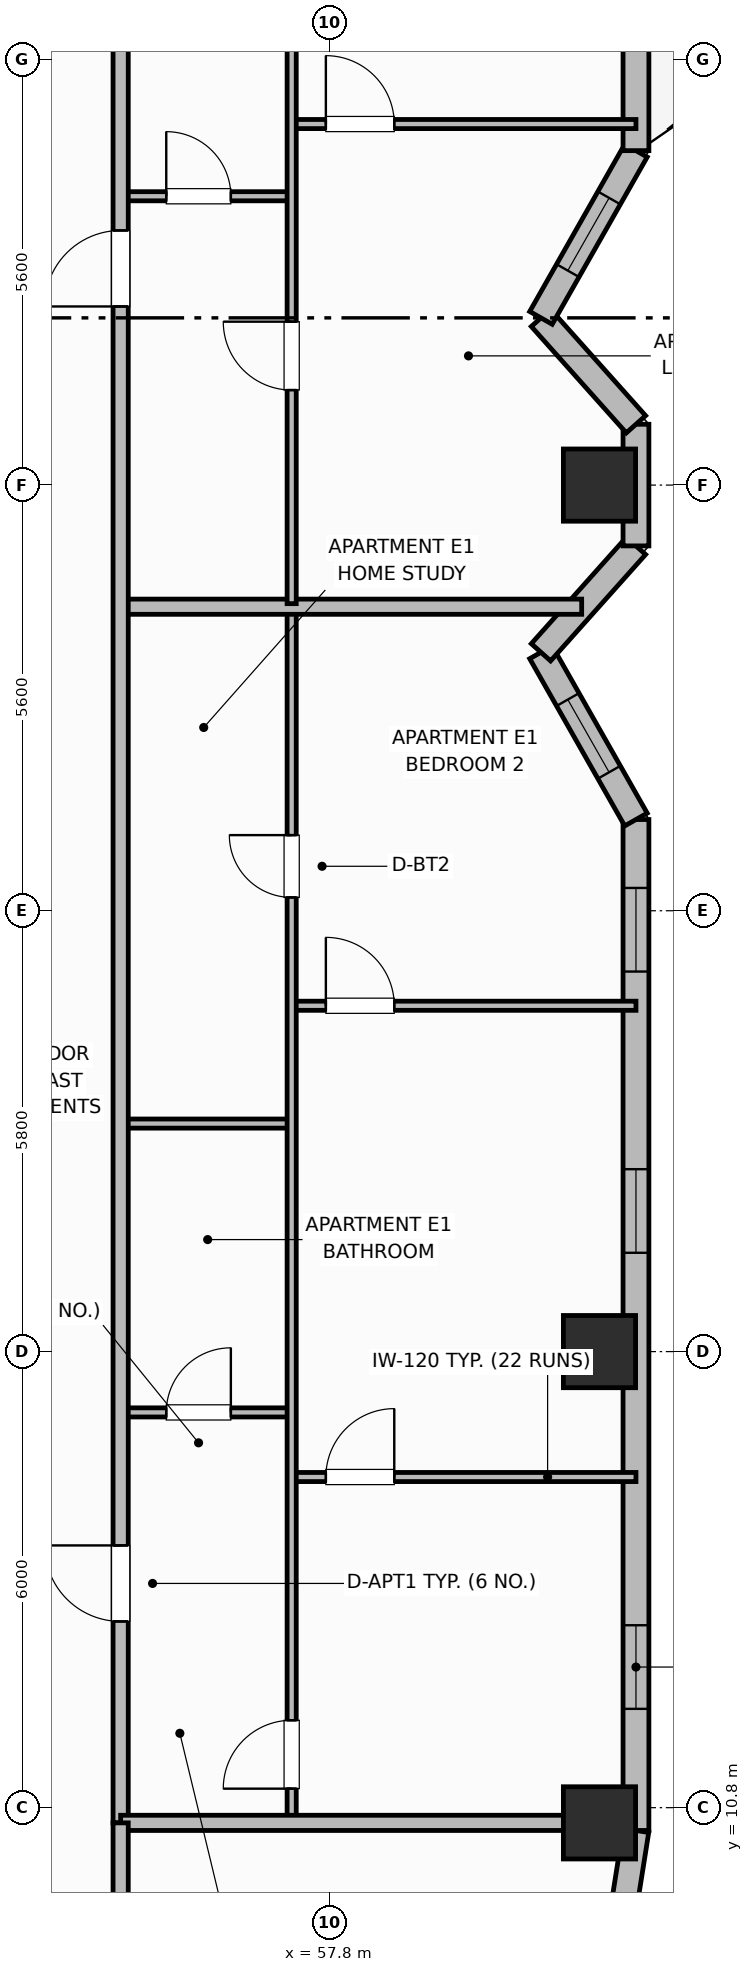
"""IFC4 building model, lengths in metres.
Left out: names, types, materials, properties, quantities, classifications, styles, units other than length and angle.
Written with IfcOpenShell. Run it as: python <this file> out.ifc"""

import sys

from ifc_helpers import new_model, si_unit, direction, frame, frame_2d, origin, origin_2d, place, context, subcontext, project, spatial, rectangle, extrude, element, fill, save


model = new_model("IFC4")
c1 = context("Model", 3, precision=1e-05, world=origin(), true_north=direction((0.0, 1.0)))
c2 = subcontext(c1, "Body", "Model", "MODEL_VIEW")
j1 = project(units=[si_unit("LENGTHUNIT", "METRE"), si_unit("PLANEANGLEUNIT", "RADIAN")], contexts=[c1])
p1 = place(None, origin())
s1 = spatial("IfcSite", under=j1, at=p1, CompositionType="ELEMENT")
p2 = place(p1, origin())
s2 = spatial("IfcBuilding", under=s1, at=p2, CompositionType="ELEMENT")
p3 = place(p2, frame((0.0, 0.0, 170.0)))
s3 = spatial("IfcBuildingStorey", under=s2, at=p3, CompositionType="ELEMENT", Elevation=170.0)
for number, where, z_axis, x_axis in (
    (1, (61.35, 10.6, 0.0), (0.0, 0.0, 1.0), (1.0, 0.0, 0.0)),
    (2, (61.35, 16.8, 0.0), (0.0, 0.0, 1.0), (1.0, 0.0, 0.0)),
    (3, (61.35, 28.2, 0.0), (0.0, 0.0, 1.0), (1.0, 0.0, 0.0)),
):
    element("IfcColumn", number, at=place(p3, frame(where, z_axis=z_axis, x_axis=x_axis)), inside=s3, PredefinedType="COLUMN", context=c2, shape_type="SweptSolid", body=[
        extrude(rectangle(XDim=0.95, YDim=0.95, at=origin_2d()), origin(), (0.0, 0.0, 1.0), 3.7),
    ])
p4 = place(p3, frame((61.652, 9.378, 0.0), z_axis=(0.0, 0.0, 1.0), x_axis=(0.156514556949, 0.987675651954, 0.0)))
e4 = element("IfcWall", 4, at=p4, inside=s3, PredefinedType="SOLIDWALL", context=c2, shape_type="SweptSolid", body=[
    extrude(rectangle(XDim=1.135, YDim=0.34, at=frame_2d((0.568, 0.0))), origin(), (0.0, 0.0, 1.0), 2.72),
])
p5 = place(p3, frame((61.83, 10.5, 0.0), z_axis=(0.0, 0.0, 1.0), x_axis=(0.0, 1.0, 0.0)))
e5 = element("IfcWall", 5, at=p5, inside=s3, PredefinedType="SOLIDWALL", context=c2, shape_type="SweptSolid", body=[
    extrude(rectangle(XDim=13.3, YDim=0.34, at=frame_2d((6.65, 0.0))), origin(), (0.0, 0.0, 1.0), 2.72),
])
p6 = place(p5, frame((1.6, 0.0, 0.95)))
e6 = element("IfcOpeningElement", 6, at=p6, cuts=e5, PredefinedType="OPENING", context=c2, shape_type="SweptSolid", body=[
    extrude(rectangle(XDim=1.1, YDim=1.65, at=frame_2d((0.55, 0.825))), frame((0.0, 0.18, 0.0), z_axis=(0.0, -1.0, 0.0), x_axis=(1.0, 0.0, 0.0)), (0.0, 0.0, 1.0), 0.36),
])
p7 = place(p5, frame((7.6, 0.0, 0.95)))
e7 = element("IfcOpeningElement", 7, at=p7, cuts=e5, PredefinedType="OPENING", context=c2, shape_type="SweptSolid", body=[
    extrude(rectangle(XDim=1.1, YDim=1.65, at=frame_2d((0.55, 0.825))), frame((0.0, 0.18, 0.0), z_axis=(0.0, -1.0, 0.0), x_axis=(1.0, 0.0, 0.0)), (0.0, 0.0, 1.0), 0.36),
])
p8 = place(p5, frame((11.3, 0.0, 0.95)))
e8 = element("IfcOpeningElement", 8, at=p8, cuts=e5, PredefinedType="OPENING", context=c2, shape_type="SweptSolid", body=[
    extrude(rectangle(XDim=1.1, YDim=1.65, at=frame_2d((0.55, 0.825))), frame((0.0, 0.18, 0.0), z_axis=(0.0, -1.0, 0.0), x_axis=(1.0, 0.0, 0.0)), (0.0, 0.0, 1.0), 0.36),
])
p9 = place(p3, frame((61.83, 23.8, 0.0), z_axis=(0.0, 0.0, 1.0), x_axis=(-0.494017696272, 0.869451847873, 0.0)))
e9 = element("IfcWall", 9, at=p9, inside=s3, PredefinedType="SOLIDWALL", context=c2, shape_type="SweptSolid", body=[
    extrude(rectangle(XDim=2.53, YDim=0.34, at=frame_2d((1.265, 0.0))), origin(), (0.0, 0.0, 1.0), 2.72),
])
p10 = place(p9, frame((0.715, 0.0, 0.91)))
e10 = element("IfcOpeningElement", 10, at=p10, cuts=e9, PredefinedType="OPENING", context=c2, shape_type="SweptSolid", body=[
    extrude(rectangle(XDim=1.1, YDim=1.65, at=frame_2d((0.55, 0.825))), frame((0.0, 0.18, 0.0), z_axis=(0.0, -1.0, 0.0), x_axis=(1.0, 0.0, 0.0)), (0.0, 0.0, 1.0), 0.36),
])
p11 = place(p3, frame((60.58, 26.0, 0.0), z_axis=(0.0, 0.0, 1.0), x_axis=(0.666041619974, 0.74591457987, 0.0)))
e11 = element("IfcWall", 11, at=p11, inside=s3, PredefinedType="SOLIDWALL", context=c2, shape_type="SweptSolid", body=[
    extrude(rectangle(XDim=1.877, YDim=0.34, at=frame_2d((0.938, 0.0))), origin(), (0.0, 0.0, 1.0), 2.72),
])
p12 = place(p3, frame((61.83, 27.4, 0.0), z_axis=(0.0, 0.0, 1.0), x_axis=(0.0, 1.0, 0.0)))
e12 = element("IfcWall", 12, at=p12, inside=s3, PredefinedType="SOLIDWALL", context=c2, shape_type="SweptSolid", body=[
    extrude(rectangle(XDim=1.6, YDim=0.34, at=frame_2d((0.8, 0.0))), origin(), (0.0, 0.0, 1.0), 2.72),
])
p13 = place(p3, frame((61.83, 29.0, 0.0), z_axis=(0.0, 0.0, 1.0), x_axis=(-0.666041619974, 0.74591457987, 0.0)))
e13 = element("IfcWall", 13, at=p13, inside=s3, PredefinedType="SOLIDWALL", context=c2, shape_type="SweptSolid", body=[
    extrude(rectangle(XDim=1.877, YDim=0.34, at=frame_2d((0.938, 0.0))), origin(), (0.0, 0.0, 1.0), 2.72),
])
p14 = place(p3, frame((60.58, 30.4, 0.0), z_axis=(0.0, 0.0, 1.0), x_axis=(0.493976255291, 0.869475393101, 0.0)))
e14 = element("IfcWall", 14, at=p14, inside=s3, PredefinedType="SOLIDWALL", context=c2, shape_type="SweptSolid", body=[
    extrude(rectangle(XDim=2.531, YDim=0.34, at=frame_2d((1.265, 0.0))), origin(), (0.0, 0.0, 1.0), 2.72),
])
p15 = place(p14, frame((0.715, 0.0, 0.91)))
e15 = element("IfcOpeningElement", 15, at=p15, cuts=e14, PredefinedType="OPENING", context=c2, shape_type="SweptSolid", body=[
    extrude(rectangle(XDim=1.1, YDim=1.65, at=frame_2d((0.55, 0.825))), frame((0.0, 0.18, 0.0), z_axis=(0.0, -1.0, 0.0), x_axis=(1.0, 0.0, 0.0)), (0.0, 0.0, 1.0), 0.36),
])
p16 = place(p3, frame((61.83, 32.6, 0.0), z_axis=(0.0, 0.0, 1.0), x_axis=(0.0, 1.0, 0.0)))
e16 = element("IfcWall", 16, at=p16, inside=s3, PredefinedType="SOLIDWALL", context=c2, shape_type="SweptSolid", body=[
    extrude(rectangle(XDim=13.3, YDim=0.34, at=frame_2d((6.65, 0.0))), origin(), (0.0, 0.0, 1.0), 2.72),
])
p17 = place(p16, frame((1.7, 0.0, 0.0)))
e17 = element("IfcOpeningElement", 17, at=p17, cuts=e16, PredefinedType="OPENING", context=c2, shape_type="SweptSolid", body=[
    extrude(rectangle(XDim=1.6, YDim=2.1, at=frame_2d((0.8, 1.05))), frame((0.0, 0.18, 0.0), z_axis=(0.0, -1.0, 0.0), x_axis=(1.0, 0.0, 0.0)), (0.0, 0.0, 1.0), 0.36),
])
p18 = place(p16, frame((9.6, 0.0, 0.7)))
e18 = element("IfcOpeningElement", 18, at=p18, cuts=e16, PredefinedType="OPENING", context=c2, shape_type="SweptSolid", body=[
    extrude(rectangle(XDim=2.1, YDim=1.9, at=frame_2d((1.05, 0.95))), frame((0.0, 0.18, 0.0), z_axis=(0.0, -1.0, 0.0), x_axis=(1.0, 0.0, 0.0)), (0.0, 0.0, 1.0), 0.36),
])
p19 = place(p3, frame((55.05, 16.0, 0.0), z_axis=(0.0, 0.0, 1.0), x_axis=(1.0, 0.0, 0.0)))
e19 = element("IfcWall", 19, at=p19, inside=s3, PredefinedType="PARTITIONING", context=c2, shape_type="SweptSolid", body=[
    extrude(rectangle(XDim=2.25, YDim=0.12, at=frame_2d((1.125, 0.0))), origin(), (0.0, 0.0, 1.0), 2.55),
])
p20 = place(p19, frame((0.6, 0.0, 0.0)))
e20 = element("IfcOpeningElement", 20, at=p20, cuts=e19, PredefinedType="OPENING", context=c2, shape_type="SweptSolid", body=[
    extrude(rectangle(XDim=0.85, YDim=2.1, at=frame_2d((0.425, 1.05))), frame((0.0, 0.07, 0.0), z_axis=(0.0, -1.0, 0.0), x_axis=(1.0, 0.0, 0.0)), (0.0, 0.0, 1.0), 0.14),
])
p21 = place(p3, frame((55.05, 19.8, 0.0), z_axis=(0.0, 0.0, 1.0), x_axis=(1.0, 0.0, 0.0)))
e21 = element("IfcWall", 21, at=p21, inside=s3, PredefinedType="PARTITIONING", context=c2, shape_type="SweptSolid", body=[
    extrude(rectangle(XDim=2.25, YDim=0.12, at=frame_2d((1.125, 0.0))), origin(), (0.0, 0.0, 1.0), 2.55),
])
p22 = place(p3, frame((57.3, 15.15, 0.0), z_axis=(0.0, 0.0, 1.0), x_axis=(1.0, 0.0, 0.0)))
e22 = element("IfcWall", 22, at=p22, inside=s3, PredefinedType="PARTITIONING", context=c2, shape_type="SweptSolid", body=[
    extrude(rectangle(XDim=4.53, YDim=0.12, at=frame_2d((2.265, 0.0))), origin(), (0.0, 0.0, 1.0), 2.55),
])
p23 = place(p22, frame((0.45, 0.0, 0.0)))
e23 = element("IfcOpeningElement", 23, at=p23, cuts=e22, PredefinedType="OPENING", context=c2, shape_type="SweptSolid", body=[
    extrude(rectangle(XDim=0.9, YDim=2.1, at=frame_2d((0.45, 1.05))), frame((0.0, 0.07, 0.0), z_axis=(0.0, -1.0, 0.0), x_axis=(1.0, 0.0, 0.0)), (0.0, 0.0, 1.0), 0.14),
])
p24 = place(p3, frame((57.3, 21.35, 0.0), z_axis=(0.0, 0.0, 1.0), x_axis=(1.0, 0.0, 0.0)))
e24 = element("IfcWall", 24, at=p24, inside=s3, PredefinedType="PARTITIONING", context=c2, shape_type="SweptSolid", body=[
    extrude(rectangle(XDim=4.53, YDim=0.12, at=frame_2d((2.265, 0.0))), origin(), (0.0, 0.0, 1.0), 2.55),
])
p25 = place(p24, frame((0.45, 0.0, 0.0)))
e25 = element("IfcOpeningElement", 25, at=p25, cuts=e24, PredefinedType="OPENING", context=c2, shape_type="SweptSolid", body=[
    extrude(rectangle(XDim=0.9, YDim=2.1, at=frame_2d((0.45, 1.05))), frame((0.0, 0.07, 0.0), z_axis=(0.0, -1.0, 0.0), x_axis=(1.0, 0.0, 0.0)), (0.0, 0.0, 1.0), 0.14),
])
p26 = place(p3, frame((57.3, 10.64, 0.0), z_axis=(0.0, 0.0, 1.0), x_axis=(0.0, 1.0, 0.0)))
e26 = element("IfcWall", 26, at=p26, inside=s3, PredefinedType="PARTITIONING", context=c2, shape_type="SweptSolid", body=[
    extrude(rectangle(XDim=15.92, YDim=0.12, at=frame_2d((7.96, 0.0))), origin(), (0.0, 0.0, 1.0), 2.55),
])
p27 = place(p26, frame((0.41, 0.0, 0.0)))
e27 = element("IfcOpeningElement", 27, at=p27, cuts=e26, PredefinedType="OPENING", context=c2, shape_type="SweptSolid", body=[
    extrude(rectangle(XDim=0.9, YDim=2.1, at=frame_2d((0.45, 1.05))), frame((0.0, 0.07, 0.0), z_axis=(0.0, -1.0, 0.0), x_axis=(1.0, 0.0, 0.0)), (0.0, 0.0, 1.0), 0.14),
])
p28 = place(p26, frame((12.135, 0.0, 0.0)))
e28 = element("IfcOpeningElement", 28, at=p28, cuts=e26, PredefinedType="OPENING", context=c2, shape_type="SweptSolid", body=[
    extrude(rectangle(XDim=0.82, YDim=2.08, at=frame_2d((0.41, 1.04))), frame((0.0, 0.07, 0.0), z_axis=(0.0, -1.0, 0.0), x_axis=(1.0, 0.0, 0.0)), (0.0, 0.0, 1.0), 0.14),
])
p29 = place(p3, frame((55.05, 26.6, 0.0), z_axis=(0.0, 0.0, 1.0), x_axis=(1.0, 0.0, 0.0)))
e29 = element("IfcWall", 29, at=p29, inside=s3, PredefinedType="PARTITIONING", context=c2, shape_type="SweptSolid", body=[
    extrude(rectangle(XDim=6.066, YDim=0.2, at=frame_2d((3.033, 0.0))), origin(), (0.0, 0.0, 1.0), 2.55),
])
p30 = place(p3, frame((55.05, 32.0, 0.0), z_axis=(0.0, 0.0, 1.0), x_axis=(1.0, 0.0, 0.0)))
e30 = element("IfcWall", 30, at=p30, inside=s3, PredefinedType="PARTITIONING", context=c2, shape_type="SweptSolid", body=[
    extrude(rectangle(XDim=2.25, YDim=0.12, at=frame_2d((1.125, 0.0))), origin(), (0.0, 0.0, 1.0), 2.55),
])
p31 = place(p30, frame((0.6, 0.0, 0.0)))
e31 = element("IfcOpeningElement", 31, at=p31, cuts=e30, PredefinedType="OPENING", context=c2, shape_type="SweptSolid", body=[
    extrude(rectangle(XDim=0.85, YDim=2.1, at=frame_2d((0.425, 1.05))), frame((0.0, 0.07, 0.0), z_axis=(0.0, -1.0, 0.0), x_axis=(1.0, 0.0, 0.0)), (0.0, 0.0, 1.0), 0.14),
])
p32 = place(p3, frame((57.3, 32.95, 0.0), z_axis=(0.0, 0.0, 1.0), x_axis=(1.0, 0.0, 0.0)))
e32 = element("IfcWall", 32, at=p32, inside=s3, PredefinedType="PARTITIONING", context=c2, shape_type="SweptSolid", body=[
    extrude(rectangle(XDim=4.53, YDim=0.12, at=frame_2d((2.265, 0.0))), origin(), (0.0, 0.0, 1.0), 2.55),
])
p33 = place(p32, frame((0.45, 0.0, 0.0)))
e33 = element("IfcOpeningElement", 33, at=p33, cuts=e32, PredefinedType="OPENING", context=c2, shape_type="SweptSolid", body=[
    extrude(rectangle(XDim=0.9, YDim=2.1, at=frame_2d((0.45, 1.05))), frame((0.0, 0.07, 0.0), z_axis=(0.0, -1.0, 0.0), x_axis=(1.0, 0.0, 0.0)), (0.0, 0.0, 1.0), 0.14),
])
p34 = place(p3, frame((57.3, 26.64, 0.0), z_axis=(0.0, 0.0, 1.0), x_axis=(0.0, 1.0, 0.0)))
e34 = element("IfcWall", 34, at=p34, inside=s3, PredefinedType="PARTITIONING", context=c2, shape_type="SweptSolid", body=[
    extrude(rectangle(XDim=19.12, YDim=0.12, at=frame_2d((9.56, 0.0))), origin(), (0.0, 0.0, 1.0), 2.55),
])
p35 = place(p34, frame((2.81, 0.0, 0.0)))
e35 = element("IfcOpeningElement", 35, at=p35, cuts=e34, PredefinedType="OPENING", context=c2, shape_type="SweptSolid", body=[
    extrude(rectangle(XDim=0.9, YDim=2.1, at=frame_2d((0.45, 1.05))), frame((0.0, 0.07, 0.0), z_axis=(0.0, -1.0, 0.0), x_axis=(1.0, 0.0, 0.0)), (0.0, 0.0, 1.0), 0.14),
])
p36 = place(p34, frame((15.365, 0.0, 0.0)))
e36 = element("IfcOpeningElement", 36, at=p36, cuts=e34, PredefinedType="OPENING", context=c2, shape_type="SweptSolid", body=[
    extrude(rectangle(XDim=0.82, YDim=2.08, at=frame_2d((0.41, 1.04))), frame((0.0, 0.07, 0.0), z_axis=(0.0, -1.0, 0.0), x_axis=(1.0, 0.0, 0.0)), (0.0, 0.0, 1.0), 0.14),
])
p37 = place(p3, frame((55.05, 10.6, 0.0), z_axis=(0.0, 0.0, 1.0), x_axis=(0.0, 1.0, 0.0)))
e37 = element("IfcWall", 37, at=p37, inside=s3, PredefinedType="PARTITIONING", context=c2, shape_type="SweptSolid", body=[
    extrude(rectangle(XDim=35.2, YDim=0.2, at=frame_2d((17.6, 0.0))), origin(), (0.0, 0.0, 1.0), 2.55),
])
p38 = place(p37, frame((2.65, 0.0, 0.0)))
e38 = element("IfcOpeningElement", 38, at=p38, cuts=e37, PredefinedType="OPENING", context=c2, shape_type="SweptSolid", body=[
    extrude(rectangle(XDim=1.0, YDim=2.15, at=frame_2d((0.5, 1.075))), frame((0.0, 0.11, 0.0), z_axis=(0.0, -1.0, 0.0), x_axis=(1.0, 0.0, 0.0)), (0.0, 0.0, 1.0), 0.22),
])
p39 = place(p37, frame((19.95, 0.0, 0.0)))
e39 = element("IfcOpeningElement", 39, at=p39, cuts=e37, PredefinedType="OPENING", context=c2, shape_type="SweptSolid", body=[
    extrude(rectangle(XDim=1.0, YDim=2.15, at=frame_2d((0.5, 1.075))), frame((0.0, 0.11, 0.0), z_axis=(0.0, -1.0, 0.0), x_axis=(1.0, 0.0, 0.0)), (0.0, 0.0, 1.0), 0.22),
])
p40 = place(p3, frame((55.05, 10.6, 0.0), z_axis=(0.0, 0.0, 1.0), x_axis=(1.0, 0.0, 0.0)))
e40 = element("IfcWall", 40, at=p40, inside=s3, PredefinedType="PARTITIONING", context=c2, shape_type="SweptSolid", body=[
    extrude(rectangle(XDim=6.36, YDim=0.2, at=frame_2d((3.18, 0.0))), origin(), (0.0, 0.0, 1.0), 2.55),
])
p41 = place(p3, frame((55.05, 6.87, 0.0), z_axis=(0.0, 0.0, 1.0), x_axis=(0.0, 1.0, 0.0)))
e41 = element("IfcWall", 41, at=p41, inside=s3, PredefinedType="PARTITIONING", context=c2, shape_type="SweptSolid", body=[
    extrude(rectangle(XDim=3.73, YDim=0.2, at=frame_2d((1.865, 0.0))), origin(), (0.0, 0.0, 1.0), 2.55),
])
p42 = place(p6, origin())
e42 = element("IfcWindow", 42, at=p42, inside=s3, PartitioningType="SINGLE_PANEL", PredefinedType="WINDOW", context=c2, shape_type="SweptSolid", body=[
    extrude(rectangle(XDim=1.1, YDim=1.65, at=frame_2d((0.55, 0.825))), frame((0.0, 0.03, 0.0), z_axis=(0.0, -1.0, 0.0), x_axis=(1.0, 0.0, 0.0)), (0.0, 0.0, 1.0), 0.06),
])
fill(e6, e42)
p43 = place(p7, origin())
e43 = element("IfcWindow", 43, at=p43, inside=s3, PartitioningType="SINGLE_PANEL", PredefinedType="WINDOW", context=c2, shape_type="SweptSolid", body=[
    extrude(rectangle(XDim=1.1, YDim=1.65, at=frame_2d((0.55, 0.825))), frame((0.0, 0.03, 0.0), z_axis=(0.0, -1.0, 0.0), x_axis=(1.0, 0.0, 0.0)), (0.0, 0.0, 1.0), 0.06),
])
fill(e7, e43)
p44 = place(p8, origin())
e44 = element("IfcWindow", 44, at=p44, inside=s3, PartitioningType="SINGLE_PANEL", PredefinedType="WINDOW", context=c2, shape_type="SweptSolid", body=[
    extrude(rectangle(XDim=1.1, YDim=1.65, at=frame_2d((0.55, 0.825))), frame((0.0, 0.03, 0.0), z_axis=(0.0, -1.0, 0.0), x_axis=(1.0, 0.0, 0.0)), (0.0, 0.0, 1.0), 0.06),
])
fill(e8, e44)
p45 = place(p10, origin())
e45 = element("IfcWindow", 45, at=p45, inside=s3, PartitioningType="SINGLE_PANEL", PredefinedType="WINDOW", context=c2, shape_type="SweptSolid", body=[
    extrude(rectangle(XDim=1.1, YDim=1.65, at=frame_2d((0.55, 0.825))), frame((0.0, 0.03, 0.0), z_axis=(0.0, -1.0, 0.0), x_axis=(1.0, 0.0, 0.0)), (0.0, 0.0, 1.0), 0.06),
])
fill(e10, e45)
p46 = place(p15, origin())
e46 = element("IfcWindow", 46, at=p46, inside=s3, PartitioningType="SINGLE_PANEL", PredefinedType="WINDOW", context=c2, shape_type="SweptSolid", body=[
    extrude(rectangle(XDim=1.1, YDim=1.65, at=frame_2d((0.55, 0.825))), frame((0.0, 0.03, 0.0), z_axis=(0.0, -1.0, 0.0), x_axis=(1.0, 0.0, 0.0)), (0.0, 0.0, 1.0), 0.06),
])
fill(e15, e46)
p47 = place(p20, origin())
e47 = element("IfcDoor", 47, at=p47, inside=s3, OperationType="SINGLE_SWING_RIGHT", PredefinedType="DOOR", context=c2, shape_type="SweptSolid", body=[
    extrude(rectangle(XDim=0.85, YDim=2.1, at=frame_2d((0.425, 1.05))), frame((0.0, 0.025, 0.0), z_axis=(0.0, -1.0, 0.0), x_axis=(1.0, 0.0, 0.0)), (0.0, 0.0, 1.0), 0.05),
])
fill(e20, e47)
p48 = place(p23, origin())
e48 = element("IfcDoor", 48, at=p48, inside=s3, OperationType="SINGLE_SWING_RIGHT", PredefinedType="DOOR", context=c2, shape_type="SweptSolid", body=[
    extrude(rectangle(XDim=0.9, YDim=2.1, at=frame_2d((0.45, 1.05))), frame((0.0, 0.025, 0.0), z_axis=(0.0, -1.0, 0.0), x_axis=(1.0, 0.0, 0.0)), (0.0, 0.0, 1.0), 0.05),
])
fill(e23, e48)
p49 = place(p25, origin())
e49 = element("IfcDoor", 49, at=p49, inside=s3, OperationType="SINGLE_SWING_LEFT", PredefinedType="DOOR", context=c2, shape_type="SweptSolid", body=[
    extrude(rectangle(XDim=0.9, YDim=2.1, at=frame_2d((0.45, 1.05))), frame((0.0, 0.025, 0.0), z_axis=(0.0, -1.0, 0.0), x_axis=(1.0, 0.0, 0.0)), (0.0, 0.0, 1.0), 0.05),
])
fill(e25, e49)
p50 = place(p27, origin())
e50 = element("IfcDoor", 50, at=p50, inside=s3, OperationType="SINGLE_SWING_LEFT", PredefinedType="DOOR", context=c2, shape_type="SweptSolid", body=[
    extrude(rectangle(XDim=0.9, YDim=2.1, at=frame_2d((0.45, 1.05))), frame((0.0, 0.025, 0.0), z_axis=(0.0, -1.0, 0.0), x_axis=(1.0, 0.0, 0.0)), (0.0, 0.0, 1.0), 0.05),
])
fill(e27, e50)
p51 = place(p28, origin())
e51 = element("IfcDoor", 51, at=p51, inside=s3, OperationType="SINGLE_SWING_RIGHT", PredefinedType="DOOR", context=c2, shape_type="SweptSolid", body=[
    extrude(rectangle(XDim=0.82, YDim=2.08, at=frame_2d((0.41, 1.04))), frame((0.0, 0.025, 0.0), z_axis=(0.0, -1.0, 0.0), x_axis=(1.0, 0.0, 0.0)), (0.0, 0.0, 1.0), 0.05),
])
fill(e28, e51)
p52 = place(p31, origin())
e52 = element("IfcDoor", 52, at=p52, inside=s3, OperationType="SINGLE_SWING_LEFT", PredefinedType="DOOR", context=c2, shape_type="SweptSolid", body=[
    extrude(rectangle(XDim=0.85, YDim=2.1, at=frame_2d((0.425, 1.05))), frame((0.0, 0.025, 0.0), z_axis=(0.0, -1.0, 0.0), x_axis=(1.0, 0.0, 0.0)), (0.0, 0.0, 1.0), 0.05),
])
fill(e31, e52)
p53 = place(p33, origin())
e53 = element("IfcDoor", 53, at=p53, inside=s3, OperationType="SINGLE_SWING_LEFT", PredefinedType="DOOR", context=c2, shape_type="SweptSolid", body=[
    extrude(rectangle(XDim=0.9, YDim=2.1, at=frame_2d((0.45, 1.05))), frame((0.0, 0.025, 0.0), z_axis=(0.0, -1.0, 0.0), x_axis=(1.0, 0.0, 0.0)), (0.0, 0.0, 1.0), 0.05),
])
fill(e33, e53)
p54 = place(p35, origin())
e54 = element("IfcDoor", 54, at=p54, inside=s3, OperationType="SINGLE_SWING_RIGHT", PredefinedType="DOOR", context=c2, shape_type="SweptSolid", body=[
    extrude(rectangle(XDim=0.9, YDim=2.1, at=frame_2d((0.45, 1.05))), frame((0.0, 0.025, 0.0), z_axis=(0.0, -1.0, 0.0), x_axis=(1.0, 0.0, 0.0)), (0.0, 0.0, 1.0), 0.05),
])
fill(e35, e54)
p55 = place(p38, origin())
e55 = element("IfcDoor", 55, at=p55, inside=s3, OperationType="SINGLE_SWING_RIGHT", PredefinedType="DOOR", context=c2, shape_type="SweptSolid", body=[
    extrude(rectangle(XDim=1.0, YDim=2.15, at=frame_2d((0.5, 1.075))), frame((0.0, 0.025, 0.0), z_axis=(0.0, -1.0, 0.0), x_axis=(1.0, 0.0, 0.0)), (0.0, 0.0, 1.0), 0.05),
])
fill(e38, e55)
p56 = place(p39, origin())
e56 = element("IfcDoor", 56, at=p56, inside=s3, OperationType="SINGLE_SWING_LEFT", PredefinedType="DOOR", context=c2, shape_type="SweptSolid", body=[
    extrude(rectangle(XDim=1.0, YDim=2.15, at=frame_2d((0.5, 1.075))), frame((0.0, 0.025, 0.0), z_axis=(0.0, -1.0, 0.0), x_axis=(1.0, 0.0, 0.0)), (0.0, 0.0, 1.0), 0.05),
])
fill(e39, e56)
save(model, sys.argv[1])
